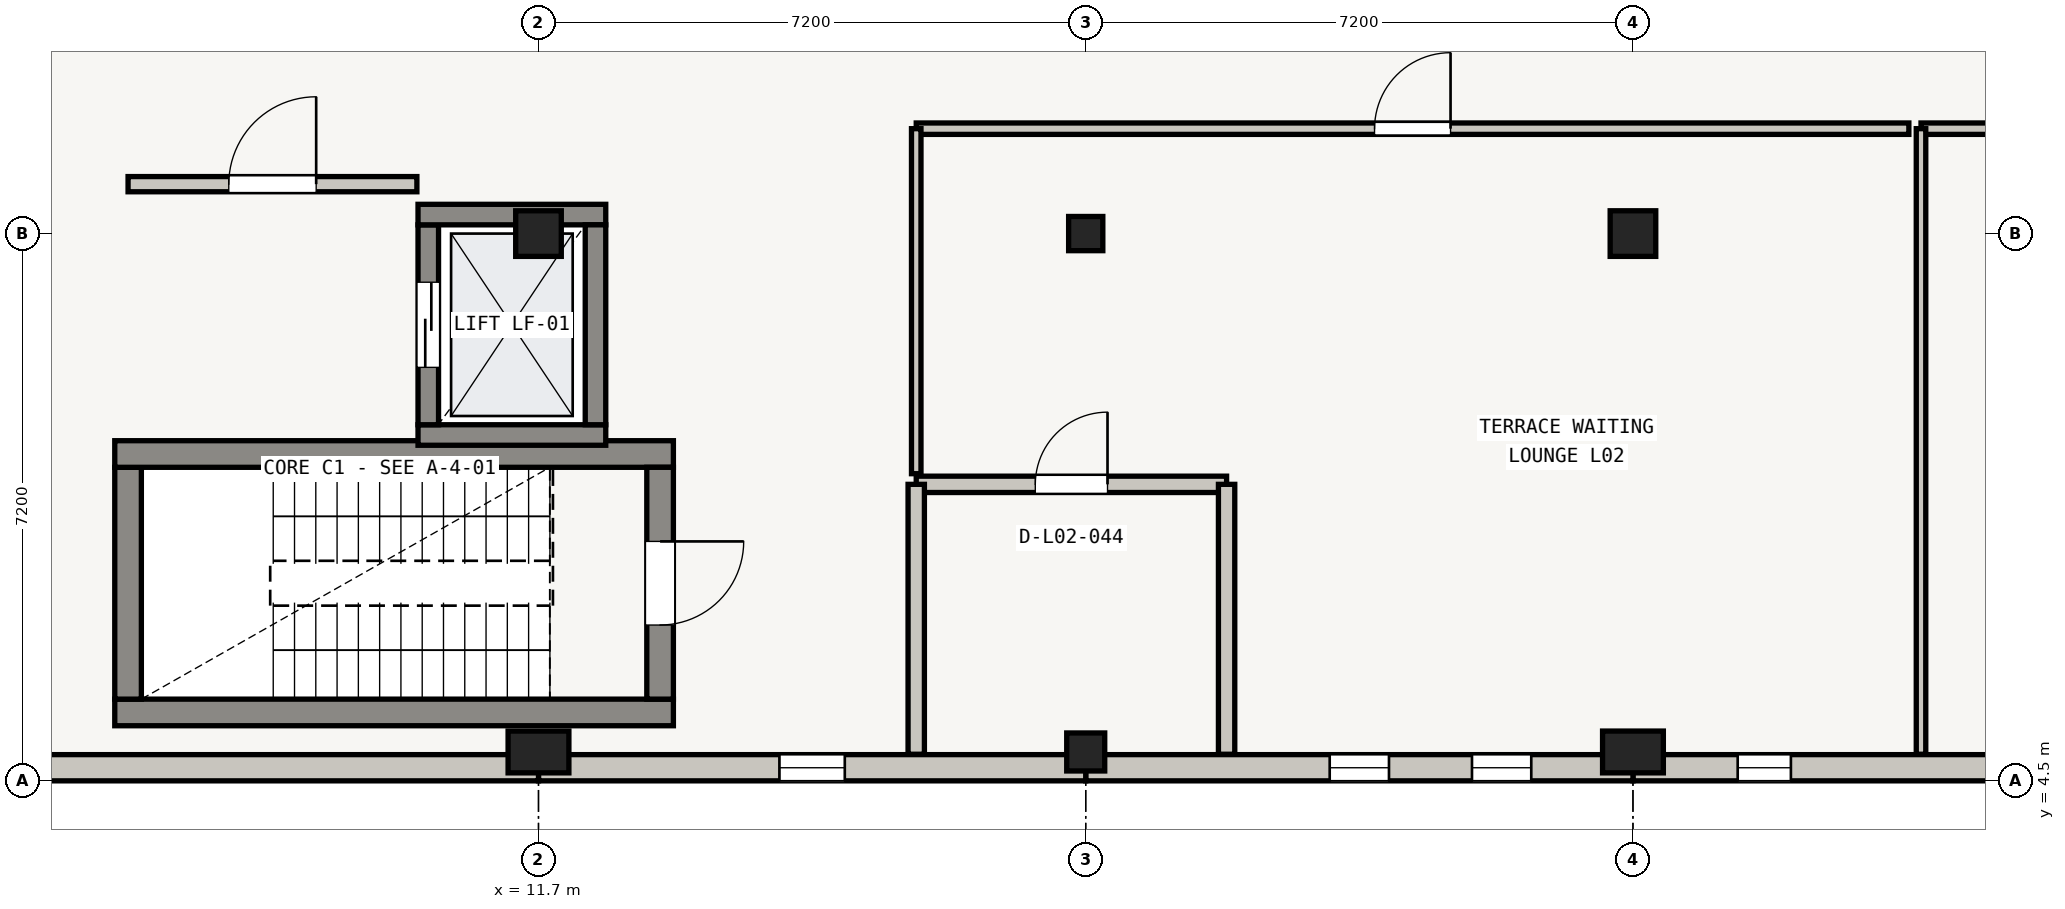
"""IFC4 building model, lengths in metres.
Left out: names, types, materials, properties, quantities, classifications, styles, units other than length and angle.
Written with IfcOpenShell. Run it as: python <this file> out.ifc"""

import sys

from ifc_helpers import new_model, si_unit, direction, frame, frame_2d, origin, origin_2d, place, context, subcontext, project, spatial, rectangle, extrude, element, fill, save


model = new_model("IFC4")
c1 = context("Model", 3, precision=1e-05, world=origin(), true_north=direction((0.0, 1.0)))
c2 = subcontext(c1, "Body", "Model", "MODEL_VIEW")
j1 = project(units=[si_unit("LENGTHUNIT", "METRE"), si_unit("PLANEANGLEUNIT", "RADIAN")], contexts=[c1])
p1 = place(None, origin())
s1 = spatial("IfcSite", under=j1, at=p1, CompositionType="ELEMENT")
p2 = place(p1, origin())
s2 = spatial("IfcBuilding", under=s1, at=p2, CompositionType="ELEMENT")
p3 = place(p2, frame((0.0, 0.0, 8.7)))
s3 = spatial("IfcBuildingStorey", under=s2, at=p3, CompositionType="ELEMENT", Elevation=8.7)
p4 = place(p3, frame((11.7, 4.88, 0.0), z_axis=(0.0, 0.0, 1.0), x_axis=(1.0, 0.0, 0.0)))
e1 = element("IfcColumn", 1, at=p4, inside=s3, PredefinedType="COLUMN", context=c2, shape_type="SweptSolid", body=[
    extrude(rectangle(XDim=0.8, YDim=0.55, at=origin_2d()), origin(), (0.0, 0.0, 1.0), 3.92),
])
p5 = place(p3, frame((11.7, 11.7, 0.0), z_axis=(0.0, 0.0, 1.0), x_axis=(1.0, 0.0, 0.0)))
e2 = element("IfcColumn", 2, at=p5, inside=s3, PredefinedType="COLUMN", context=c2, shape_type="SweptSolid", body=[
    extrude(rectangle(XDim=0.6, YDim=0.6, at=origin_2d()), origin(), (0.0, 0.0, 1.0), 3.92),
])
p6 = place(p3, frame((18.9, 4.88, 0.0), z_axis=(0.0, 0.0, 1.0), x_axis=(1.0, 0.0, 0.0)))
e3 = element("IfcColumn", 3, at=p6, inside=s3, PredefinedType="COLUMN", context=c2, shape_type="SweptSolid", body=[
    extrude(rectangle(XDim=0.5, YDim=0.5, at=origin_2d()), origin(), (0.0, 0.0, 1.0), 3.92),
])
p7 = place(p3, frame((18.9, 11.7, 0.0), z_axis=(0.0, 0.0, 1.0), x_axis=(1.0, 0.0, 0.0)))
e4 = element("IfcColumn", 4, at=p7, inside=s3, PredefinedType="COLUMN", context=c2, shape_type="SweptSolid", body=[
    extrude(rectangle(XDim=0.45, YDim=0.45, at=origin_2d()), origin(), (0.0, 0.0, 1.0), 3.92),
])
p8 = place(p3, frame((26.1, 4.88, 0.0), z_axis=(0.0, 0.0, 1.0), x_axis=(1.0, 0.0, 0.0)))
e5 = element("IfcColumn", 5, at=p8, inside=s3, PredefinedType="COLUMN", context=c2, shape_type="SweptSolid", body=[
    extrude(rectangle(XDim=0.8, YDim=0.55, at=origin_2d()), origin(), (0.0, 0.0, 1.0), 3.92),
])
p9 = place(p3, frame((26.1, 11.7, 0.0), z_axis=(0.0, 0.0, 1.0), x_axis=(1.0, 0.0, 0.0)))
e6 = element("IfcColumn", 6, at=p9, inside=s3, PredefinedType="COLUMN", context=c2, shape_type="SweptSolid", body=[
    extrude(rectangle(XDim=0.6, YDim=0.6, at=origin_2d()), origin(), (0.0, 0.0, 1.0), 3.92),
])
p10 = place(p3, frame((33.3, 4.673, 0.0), z_axis=(0.0, 0.0, 1.0), x_axis=(-1.0, 0.0, 0.0)))
e7 = element("IfcWall", 7, at=p10, inside=s3, PredefinedType="SOLIDWALL", context=c2, shape_type="SweptSolid", body=[
    extrude(rectangle(XDim=7.2, YDim=0.345, at=frame_2d((3.6, 0.0))), origin(), (0.0, 0.0, 1.0), 2.955),
])
p11 = place(p10, frame((1.378, 0.0, 0.6)))
e8 = element("IfcOpeningElement", 8, at=p11, cuts=e7, PredefinedType="OPENING", context=c2, shape_type="SweptSolid", body=[
    extrude(rectangle(XDim=0.7, YDim=1.92, at=frame_2d((0.35, 0.96))), frame((0.0, 0.172, 0.0), z_axis=(0.0, -1.0, 0.0), x_axis=(1.0, 0.0, 0.0)), (0.0, 0.0, 1.0), 0.345),
])
p12 = place(p10, frame((5.122, 0.0, 0.6)))
e9 = element("IfcOpeningElement", 9, at=p12, cuts=e7, PredefinedType="OPENING", context=c2, shape_type="SweptSolid", body=[
    extrude(rectangle(XDim=0.7, YDim=1.92, at=frame_2d((0.35, 0.96))), frame((0.0, 0.172, 0.0), z_axis=(0.0, -1.0, 0.0), x_axis=(1.0, 0.0, 0.0)), (0.0, 0.0, 1.0), 0.345),
])
p13 = place(p3, frame((26.1, 4.673, 0.0), z_axis=(0.0, 0.0, 1.0), x_axis=(-1.0, 0.0, 0.0)))
e10 = element("IfcWall", 10, at=p13, inside=s3, PredefinedType="SOLIDWALL", context=c2, shape_type="SweptSolid", body=[
    extrude(rectangle(XDim=7.2, YDim=0.345, at=frame_2d((3.6, 0.0))), origin(), (0.0, 0.0, 1.0), 2.955),
])
p14 = place(p13, frame((1.338, 0.0, 0.6)))
e11 = element("IfcOpeningElement", 11, at=p14, cuts=e10, PredefinedType="OPENING", context=c2, shape_type="SweptSolid", body=[
    extrude(rectangle(XDim=0.78, YDim=1.95, at=frame_2d((0.39, 0.975))), frame((0.0, 0.172, 0.0), z_axis=(0.0, -1.0, 0.0), x_axis=(1.0, 0.0, 0.0)), (0.0, 0.0, 1.0), 0.345),
])
p15 = place(p13, frame((3.21, 0.0, 0.6)))
e12 = element("IfcOpeningElement", 12, at=p15, cuts=e10, PredefinedType="OPENING", context=c2, shape_type="SweptSolid", body=[
    extrude(rectangle(XDim=0.78, YDim=1.95, at=frame_2d((0.39, 0.975))), frame((0.0, 0.172, 0.0), z_axis=(0.0, -1.0, 0.0), x_axis=(1.0, 0.0, 0.0)), (0.0, 0.0, 1.0), 0.345),
])
p16 = place(p3, frame((18.9, 4.673, 0.0), z_axis=(0.0, 0.0, 1.0), x_axis=(-1.0, 0.0, 0.0)))
e13 = element("IfcWall", 13, at=p16, inside=s3, PredefinedType="SOLIDWALL", context=c2, shape_type="SweptSolid", body=[
    extrude(rectangle(XDim=7.2, YDim=0.345, at=frame_2d((3.6, 0.0))), origin(), (0.0, 0.0, 1.0), 3.285),
])
p17 = place(p16, frame((3.17, 0.0, 0.55)))
e14 = element("IfcOpeningElement", 14, at=p17, cuts=e13, PredefinedType="OPENING", context=c2, shape_type="SweptSolid", body=[
    extrude(rectangle(XDim=0.86, YDim=2.2, at=frame_2d((0.43, 1.1))), frame((0.0, 0.172, 0.0), z_axis=(0.0, -1.0, 0.0), x_axis=(1.0, 0.0, 0.0)), (0.0, 0.0, 1.0), 0.345),
])
p18 = place(p3, frame((11.7, 4.673, 0.0), z_axis=(0.0, 0.0, 1.0), x_axis=(-1.0, 0.0, 0.0)))
e15 = element("IfcWall", 15, at=p18, inside=s3, PredefinedType="SOLIDWALL", context=c2, shape_type="SweptSolid", body=[
    extrude(rectangle(XDim=7.2, YDim=0.345, at=frame_2d((3.6, 0.0))), origin(), (0.0, 0.0, 1.0), 3.285),
])
p19 = place(p3, frame((13.475, 5.4, 0.0), z_axis=(0.0, 0.0, 1.0), x_axis=(-1.0, 0.0, 0.0)))
e16 = element("IfcWall", 16, at=p19, inside=s3, PredefinedType="SHEAR", context=c2, shape_type="SweptSolid", body=[
    extrude(rectangle(XDim=7.35, YDim=0.35, at=frame_2d((3.675, 0.0))), origin(), (0.0, 0.0, 1.0), 3.92),
])
p20 = place(p3, frame((6.3, 5.575, 0.0), z_axis=(0.0, 0.0, 1.0), x_axis=(0.0, 1.0, 0.0)))
e17 = element("IfcWall", 17, at=p20, inside=s3, PredefinedType="SHEAR", context=c2, shape_type="SweptSolid", body=[
    extrude(rectangle(XDim=3.05, YDim=0.35, at=frame_2d((1.525, 0.0))), origin(), (0.0, 0.0, 1.0), 3.92),
])
p21 = place(p3, frame((6.125, 8.8, 0.0), z_axis=(0.0, 0.0, 1.0), x_axis=(1.0, 0.0, 0.0)))
e18 = element("IfcWall", 18, at=p21, inside=s3, PredefinedType="SHEAR", context=c2, shape_type="SweptSolid", body=[
    extrude(rectangle(XDim=7.35, YDim=0.35, at=frame_2d((3.675, 0.0))), origin(), (0.0, 0.0, 1.0), 3.92),
])
p22 = place(p3, frame((13.3, 8.625, 0.0), z_axis=(0.0, 0.0, 1.0), x_axis=(0.0, -1.0, 0.0)))
e19 = element("IfcWall", 19, at=p22, inside=s3, PredefinedType="SHEAR", context=c2, shape_type="SweptSolid", body=[
    extrude(rectangle(XDim=3.05, YDim=0.35, at=frame_2d((1.525, 0.0))), origin(), (0.0, 0.0, 1.0), 3.92),
])
p23 = place(p22, frame((0.975, 0.0, 0.0)))
e20 = element("IfcOpeningElement", 20, at=p23, cuts=e19, PredefinedType="OPENING", context=c2, shape_type="SweptSolid", body=[
    extrude(rectangle(XDim=1.1, YDim=2.05, at=frame_2d((0.55, 1.025))), frame((0.0, 0.175, 0.0), z_axis=(0.0, -1.0, 0.0), x_axis=(1.0, 0.0, 0.0)), (0.0, 0.0, 1.0), 0.35),
])
p24 = place(p3, frame((12.585, 9.05, 0.0), z_axis=(0.0, 0.0, 1.0), x_axis=(-1.0, 0.0, 0.0)))
e21 = element("IfcWall", 21, at=p24, inside=s3, PredefinedType="SHEAR", context=c2, shape_type="SweptSolid", body=[
    extrude(rectangle(XDim=2.47, YDim=0.27, at=frame_2d((1.235, 0.0))), origin(), (0.0, 0.0, 1.0), 3.92),
])
p25 = place(p3, frame((10.25, 9.185, 0.0), z_axis=(0.0, 0.0, 1.0), x_axis=(0.0, 1.0, 0.0)))
e22 = element("IfcWall", 22, at=p25, inside=s3, PredefinedType="SHEAR", context=c2, shape_type="SweptSolid", body=[
    extrude(rectangle(XDim=2.63, YDim=0.27, at=frame_2d((1.315, 0.0))), origin(), (0.0, 0.0, 1.0), 3.92),
])
p26 = place(p25, frame((0.755, 0.0, 0.0)))
e23 = element("IfcOpeningElement", 23, at=p26, cuts=e22, PredefinedType="OPENING", context=c2, shape_type="SweptSolid", body=[
    extrude(rectangle(XDim=1.12, YDim=2.1, at=frame_2d((0.56, 1.05))), frame((0.0, 0.135, 0.0), z_axis=(0.0, -1.0, 0.0), x_axis=(1.0, 0.0, 0.0)), (0.0, 0.0, 1.0), 0.27),
])
p27 = place(p3, frame((10.115, 11.95, 0.0), z_axis=(0.0, 0.0, 1.0), x_axis=(1.0, 0.0, 0.0)))
e24 = element("IfcWall", 24, at=p27, inside=s3, PredefinedType="SHEAR", context=c2, shape_type="SweptSolid", body=[
    extrude(rectangle(XDim=2.47, YDim=0.27, at=frame_2d((1.235, 0.0))), origin(), (0.0, 0.0, 1.0), 3.92),
])
p28 = place(p3, frame((12.45, 11.815, 0.0), z_axis=(0.0, 0.0, 1.0), x_axis=(0.0, -1.0, 0.0)))
e25 = element("IfcWall", 25, at=p28, inside=s3, PredefinedType="SHEAR", context=c2, shape_type="SweptSolid", body=[
    extrude(rectangle(XDim=2.63, YDim=0.27, at=frame_2d((1.315, 0.0))), origin(), (0.0, 0.0, 1.0), 3.92),
])
p29 = place(p3, frame((6.3, 12.35, 0.0), z_axis=(0.0, 0.0, 1.0), x_axis=(1.0, 0.0, 0.0)))
e26 = element("IfcWall", 26, at=p29, inside=s3, PredefinedType="SOLIDWALL", context=c2, shape_type="SweptSolid", body=[
    extrude(rectangle(XDim=3.8, YDim=0.2, at=frame_2d((1.9, 0.0))), origin(), (0.0, 0.0, 1.0), 2.94),
])
p30 = place(p29, frame((1.325, 0.0, 0.0)))
e27 = element("IfcOpeningElement", 27, at=p30, cuts=e26, PredefinedType="OPENING", context=c2, shape_type="SweptSolid", body=[
    extrude(rectangle(XDim=1.15, YDim=2.05, at=frame_2d((0.575, 1.025))), frame((0.0, 0.1, 0.0), z_axis=(0.0, -1.0, 0.0), x_axis=(1.0, 0.0, 0.0)), (0.0, 0.0, 1.0), 0.2),
])
p31 = place(p3, frame((16.67, 8.401, 0.0), z_axis=(0.0, 0.0, 1.0), x_axis=(1.0, 0.0, 0.0)))
e28 = element("IfcWall", 28, at=p31, inside=s3, PredefinedType="PLUMBINGWALL", context=c2, shape_type="SweptSolid", body=[
    extrude(rectangle(XDim=4.083, YDim=0.215, at=frame_2d((2.042, 0.0))), origin(), (0.0, 0.0, 1.0), 2.94),
])
p32 = place(p31, frame((1.567, 0.0, 0.0)))
e29 = element("IfcOpeningElement", 29, at=p32, cuts=e28, PredefinedType="OPENING", context=c2, shape_type="SweptSolid", body=[
    extrude(rectangle(XDim=0.95, YDim=2.05, at=frame_2d((0.475, 1.025))), frame((0.0, 0.107, 0.0), z_axis=(0.0, -1.0, 0.0), x_axis=(1.0, 0.0, 0.0)), (0.0, 0.0, 1.0), 0.215),
])
for number, where, z_axis, x_axis in (
    (30, (20.753, 8.401, 0.0), (0.0, 0.0, 1.0), (0.0, -1.0, 0.0)),
    (31, (16.67, 4.85, 0.0), (0.0, 0.0, 1.0), (0.0, 1.0, 0.0)),
):
    element("IfcWall", number, at=place(p3, frame(where, z_axis=z_axis, x_axis=x_axis)), inside=s3, PredefinedType="PLUMBINGWALL", context=c2, shape_type="SweptSolid", body=[
        extrude(rectangle(XDim=3.551, YDim=0.215, at=frame_2d((1.775, 0.0))), origin(), (0.0, 0.0, 1.0), 2.94),
    ])
p33 = place(p3, frame((29.89, 13.08, 0.0), z_axis=(0.0, 0.0, 1.0), x_axis=(1.0, 0.0, 0.0)))
e32 = element("IfcWall", 32, at=p33, inside=s3, PredefinedType="PARTITIONING", context=c2, shape_type="SweptSolid", body=[
    extrude(rectangle(XDim=13.06, YDim=0.15, at=frame_2d((6.53, 0.0))), origin(), (0.0, 0.0, 1.0), 2.94),
])
p34 = place(p33, frame((6.01, 0.0, 0.0)))
e33 = element("IfcOpeningElement", 33, at=p34, cuts=e32, PredefinedType="OPENING", context=c2, shape_type="SweptSolid", body=[
    extrude(rectangle(XDim=1.04, YDim=2.05, at=frame_2d((0.52, 1.025))), frame((0.0, 0.075, 0.0), z_axis=(0.0, -1.0, 0.0), x_axis=(1.0, 0.0, 0.0)), (0.0, 0.0, 1.0), 0.15),
])
p35 = place(p3, frame((29.89, 4.85, 0.0), z_axis=(0.0, 0.0, 1.0), x_axis=(0.0, 1.0, 0.0)))
e34 = element("IfcWall", 34, at=p35, inside=s3, PredefinedType="PARTITIONING", context=c2, shape_type="SweptSolid", body=[
    extrude(rectangle(XDim=8.23, YDim=0.125, at=frame_2d((4.115, 0.0))), origin(), (0.0, 0.0, 1.0), 2.94),
])
p36 = place(p3, frame((16.67, 13.08, 0.0), z_axis=(0.0, 0.0, 1.0), x_axis=(1.0, 0.0, 0.0)))
e35 = element("IfcWall", 35, at=p36, inside=s3, PredefinedType="PARTITIONING", context=c2, shape_type="SweptSolid", body=[
    extrude(rectangle(XDim=13.06, YDim=0.15, at=frame_2d((6.53, 0.0))), origin(), (0.0, 0.0, 1.0), 2.94),
])
p37 = place(p36, frame((6.03, 0.0, 0.0)))
e36 = element("IfcOpeningElement", 36, at=p37, cuts=e35, PredefinedType="OPENING", context=c2, shape_type="SweptSolid", body=[
    extrude(rectangle(XDim=1.0, YDim=2.05, at=frame_2d((0.5, 1.025))), frame((0.0, 0.075, 0.0), z_axis=(0.0, -1.0, 0.0), x_axis=(1.0, 0.0, 0.0)), (0.0, 0.0, 1.0), 0.15),
])
p38 = place(p3, frame((16.67, 8.541, 0.0), z_axis=(0.0, 0.0, 1.0), x_axis=(0.0, 1.0, 0.0)))
e37 = element("IfcWall", 37, at=p38, inside=s3, PredefinedType="PARTITIONING", context=c2, shape_type="SweptSolid", body=[
    extrude(rectangle(XDim=4.539, YDim=0.125, at=frame_2d((2.27, 0.0))), origin(), (0.0, 0.0, 1.0), 2.94),
])
p39 = place(p12, origin())
e38 = element("IfcWindow", 38, at=p39, inside=s3, PartitioningType="SINGLE_PANEL", PredefinedType="WINDOW", context=c2, shape_type="SweptSolid", body=[
    extrude(rectangle(XDim=0.7, YDim=1.92, at=frame_2d((0.35, 0.96))), frame((0.0, 0.03, 0.0), z_axis=(0.0, -1.0, 0.0), x_axis=(1.0, 0.0, 0.0)), (0.0, 0.0, 1.0), 0.06),
])
fill(e9, e38)
p40 = place(p14, origin())
e39 = element("IfcWindow", 39, at=p40, inside=s3, PartitioningType="SINGLE_PANEL", PredefinedType="WINDOW", context=c2, shape_type="SweptSolid", body=[
    extrude(rectangle(XDim=0.78, YDim=1.95, at=frame_2d((0.39, 0.975))), frame((0.0, 0.03, 0.0), z_axis=(0.0, -1.0, 0.0), x_axis=(1.0, 0.0, 0.0)), (0.0, 0.0, 1.0), 0.06),
])
fill(e11, e39)
p41 = place(p15, origin())
e40 = element("IfcWindow", 40, at=p41, inside=s3, PartitioningType="SINGLE_PANEL", PredefinedType="WINDOW", context=c2, shape_type="SweptSolid", body=[
    extrude(rectangle(XDim=0.78, YDim=1.95, at=frame_2d((0.39, 0.975))), frame((0.0, 0.03, 0.0), z_axis=(0.0, -1.0, 0.0), x_axis=(1.0, 0.0, 0.0)), (0.0, 0.0, 1.0), 0.06),
])
fill(e12, e40)
p42 = place(p17, origin())
e41 = element("IfcWindow", 41, at=p42, inside=s3, PartitioningType="SINGLE_PANEL", PredefinedType="WINDOW", context=c2, shape_type="SweptSolid", body=[
    extrude(rectangle(XDim=0.86, YDim=2.2, at=frame_2d((0.43, 1.1))), frame((0.0, 0.03, 0.0), z_axis=(0.0, -1.0, 0.0), x_axis=(1.0, 0.0, 0.0)), (0.0, 0.0, 1.0), 0.06),
])
fill(e14, e41)
p43 = place(p23, origin())
e42 = element("IfcDoor", 42, at=p43, inside=s3, OperationType="SINGLE_SWING_LEFT", PredefinedType="DOOR", context=c2, shape_type="SweptSolid", body=[
    extrude(rectangle(XDim=1.1, YDim=2.05, at=frame_2d((0.55, 1.025))), frame((0.0, 0.025, 0.0), z_axis=(0.0, -1.0, 0.0), x_axis=(1.0, 0.0, 0.0)), (0.0, 0.0, 1.0), 0.05),
])
fill(e20, e42)
p44 = place(p26, origin())
e43 = element("IfcDoor", 43, at=p44, inside=s3, OperationType="DOUBLE_DOOR_SLIDING", PredefinedType="DOOR", context=c2, shape_type="SweptSolid", body=[
    extrude(rectangle(XDim=1.12, YDim=2.1, at=frame_2d((0.56, 1.05))), frame((0.0, 0.025, 0.0), z_axis=(0.0, -1.0, 0.0), x_axis=(1.0, 0.0, 0.0)), (0.0, 0.0, 1.0), 0.05),
])
fill(e23, e43)
p45 = place(p30, origin())
e44 = element("IfcDoor", 44, at=p45, inside=s3, OperationType="SINGLE_SWING_RIGHT", PredefinedType="DOOR", context=c2, shape_type="SweptSolid", body=[
    extrude(rectangle(XDim=1.15, YDim=2.05, at=frame_2d((0.575, 1.025))), frame((0.0, 0.025, 0.0), z_axis=(0.0, -1.0, 0.0), x_axis=(1.0, 0.0, 0.0)), (0.0, 0.0, 1.0), 0.05),
])
fill(e27, e44)
p46 = place(p32, origin())
e45 = element("IfcDoor", 45, at=p46, inside=s3, OperationType="SINGLE_SWING_RIGHT", PredefinedType="DOOR", context=c2, shape_type="SweptSolid", body=[
    extrude(rectangle(XDim=0.95, YDim=2.05, at=frame_2d((0.475, 1.025))), frame((0.0, 0.025, 0.0), z_axis=(0.0, -1.0, 0.0), x_axis=(1.0, 0.0, 0.0)), (0.0, 0.0, 1.0), 0.05),
])
fill(e29, e45)
p47 = place(p37, origin())
e46 = element("IfcDoor", 46, at=p47, inside=s3, OperationType="SINGLE_SWING_RIGHT", PredefinedType="DOOR", context=c2, shape_type="SweptSolid", body=[
    extrude(rectangle(XDim=1.0, YDim=2.05, at=frame_2d((0.5, 1.025))), frame((0.0, 0.025, 0.0), z_axis=(0.0, -1.0, 0.0), x_axis=(1.0, 0.0, 0.0)), (0.0, 0.0, 1.0), 0.05),
])
fill(e36, e46)
save(model, sys.argv[1])
